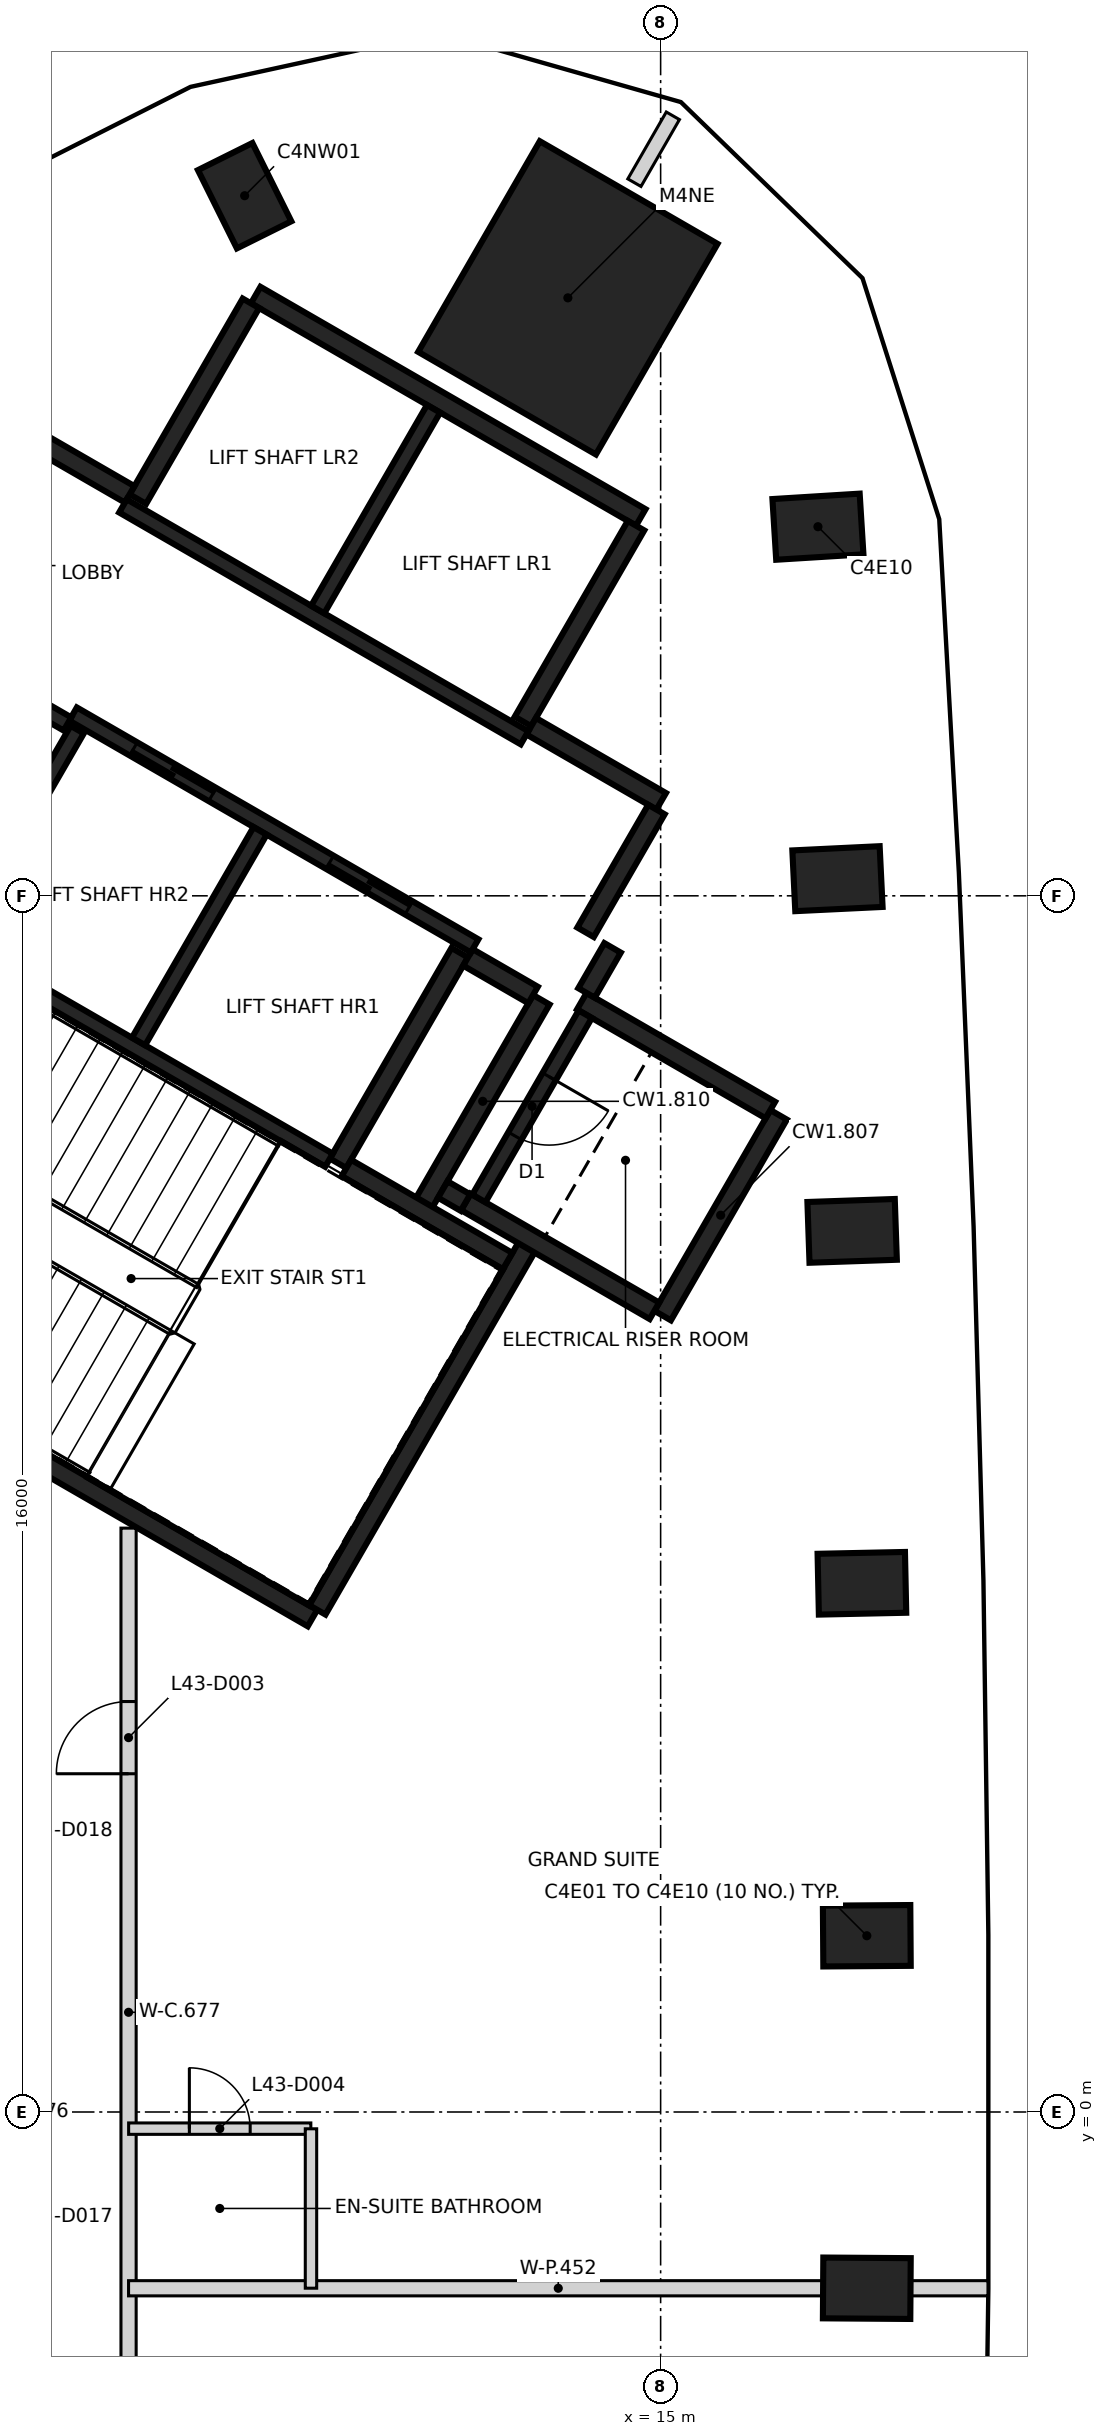
"""IFC4 building model, lengths in metres.
Left out: names, types, materials, properties, quantities, classifications, styles, units other than length and angle.
Written with IfcOpenShell. Run it as: python <this file> out.ifc"""

import sys

from ifc_helpers import new_model, si_unit, direction, frame, frame_2d, origin, origin_2d, place, context, subcontext, project, spatial, rectangle, extrude, element, fill, save


model = new_model("IFC4")
c1 = context("Model", 3, precision=1e-05, world=origin(), true_north=direction((0.0, 1.0)))
c2 = subcontext(c1, "Body", "Model", "MODEL_VIEW")
j1 = project(units=[si_unit("LENGTHUNIT", "METRE"), si_unit("PLANEANGLEUNIT", "RADIAN")], contexts=[c1])
p1 = place(None, origin())
s1 = spatial("IfcSite", under=j1, at=p1, CompositionType="ELEMENT")
p2 = place(p1, origin())
s2 = spatial("IfcBuilding", under=s1, at=p2, CompositionType="ELEMENT")
p3 = place(p2, frame((0.0, 0.0, 175.6)))
s3 = spatial("IfcBuildingStorey", under=s2, at=p3, CompositionType="ELEMENT", Elevation=175.6)
for number, where, z_axis, x_axis in (
    (1, (17.712, -2.319, -0.35), (0.0, 0.0, 1.0), (-1.0, 0.007, 0.0)),
    (2, (17.712, 2.319, -0.35), (0.0, 0.0, 1.0), (1.0, 0.007, 0.0)),
    (3, (17.648, 6.956, -0.35), (0.0, 0.0, 1.0), (1.0, 0.021, 0.0)),
    (4, (17.519, 11.592, -0.35), (0.0, 0.0, 1.0), (0.999, 0.034, 0.0)),
    (5, (17.326, 16.226, -0.35), (0.0, 0.0, 1.0), (0.999, 0.048, 0.0)),
    (6, (17.07, 20.856, -0.35), (0.0, 0.0, 1.0), (0.998, 0.062, 0.0)),
    (7, (9.527, 25.211, -0.35), (0.0, 0.0, 1.0), (-0.445, 0.895, 0.0)),
):
    element("IfcColumn", number, at=place(p3, frame(where, z_axis=z_axis, x_axis=x_axis)), inside=s3, PredefinedType="COLUMN", context=c2, shape_type="SweptSolid", body=[
        extrude(rectangle(XDim=1.15, YDim=0.8, at=origin_2d()), origin(), (0.0, 0.0, 1.0), 3.6),
    ])
p4 = place(p3, frame((13.78, 23.867, -0.35), z_axis=(0.0, 0.0, 1.0), x_axis=(0.5, 0.866025403784, 0.0)))
e8 = element("IfcColumn", 8, at=p4, inside=s3, PredefinedType="COLUMN", context=c2, shape_type="SweptSolid", body=[
    extrude(rectangle(XDim=3.2, YDim=2.7, at=origin_2d()), origin(), (0.0, 0.0, 1.0), 3.6),
])
p5 = place(p3, frame((10.42, 6.498, 0.0), z_axis=(0.0, 0.0, 1.0), x_axis=(-0.866021906294, 0.500006057782, 0.0)))
e9 = element("IfcWall", 9, at=p5, inside=s3, PredefinedType="SHEAR", context=c2, shape_type="SweptSolid", body=[
    extrude(rectangle(XDim=11.55, YDim=0.25, at=frame_2d((5.775, 0.0))), origin(), (0.0, 0.0, 1.0), 3.25),
])
p6 = place(p5, frame((10.025, 0.0, 0.0)))
e10 = element("IfcOpeningElement", 10, at=p6, cuts=e9, PredefinedType="OPENING", context=c2, shape_type="SweptSolid", body=[
    extrude(rectangle(XDim=1.2, YDim=2.1, at=frame_2d((0.6, 1.05))), frame((0.0, 0.135, 0.0), z_axis=(0.0, -1.0, 0.0), x_axis=(1.0, 0.0, 0.0)), (0.0, 0.0, 1.0), 0.27),
])
p7 = place(p5, frame((8.725, 0.0, 0.0)))
e11 = element("IfcOpeningElement", 11, at=p7, cuts=e9, PredefinedType="OPENING", context=c2, shape_type="SweptSolid", body=[
    extrude(rectangle(XDim=1.2, YDim=2.1, at=frame_2d((0.6, 1.05))), frame((0.0, 0.135, 0.0), z_axis=(0.0, -1.0, 0.0), x_axis=(1.0, 0.0, 0.0)), (0.0, 0.0, 1.0), 0.27),
])
p8 = place(p3, frame((9.673, 23.903, 0.0), z_axis=(0.0, 0.0, 1.0), x_axis=(0.86603616409, -0.499981362141, 0.0)))
e12 = element("IfcWall", 12, at=p8, inside=s3, PredefinedType="SHEAR", context=c2, shape_type="SweptSolid", body=[
    extrude(rectangle(XDim=5.85, YDim=0.25, at=frame_2d((2.925, 0.0))), origin(), (0.0, 0.0, 1.0), 3.25),
])
p9 = place(p3, frame((13.238, 11.378, 0.0), z_axis=(0.0, 0.0, 1.0), x_axis=(-0.500008851346, -0.866020293397, 0.0)))
e13 = element("IfcWall", 13, at=p9, inside=s3, PredefinedType="SHEAR", context=c2, shape_type="SweptSolid", body=[
    extrude(rectangle(XDim=5.51, YDim=0.25, at=frame_2d((2.755, 0.0))), origin(), (0.0, 0.0, 1.0), 3.25),
])
p10 = place(p3, frame((12.357, 15.252, 0.0), z_axis=(0.0, 0.0, 1.0), x_axis=(-0.500028443584, -0.866008981251, 0.0)))
e14 = element("IfcWall", 14, at=p10, inside=s3, PredefinedType="SHEAR", context=c2, shape_type="SweptSolid", body=[
    extrude(rectangle(XDim=3.2, YDim=0.25, at=frame_2d((1.6, 0.0))), origin(), (0.0, 0.0, 1.0), 3.25),
])
for number, where, z_axis, x_axis in (
    (15, (8.123, 21.219, 0.0), (0.0, 0.0, 1.0), (0.5, 0.866, 0.0)),
    (16, (14.676, 20.87, 0.0), (0.0, 0.0, 1.0), (-0.5, -0.866, 0.0)),
):
    element("IfcWall", number, at=place(p3, frame(where, z_axis=z_axis, x_axis=x_axis)), inside=s3, PredefinedType="SHEAR", context=c2, shape_type="SweptSolid", body=[
        extrude(rectangle(XDim=2.975, YDim=0.25, at=frame_2d((1.487, 0.0))), origin(), (0.0, 0.0, 1.0), 3.25),
    ])
p11 = place(p3, frame((16.552, 13.119, 0.0), z_axis=(0.0, 0.0, 1.0), x_axis=(-0.499978833458, -0.866037623948, 0.0)))
e17 = element("IfcWall", 17, at=p11, inside=s3, PredefinedType="SHEAR", context=c2, shape_type="SweptSolid", body=[
    extrude(rectangle(XDim=3.05, YDim=0.25, at=frame_2d((1.525, 0.0))), origin(), (0.0, 0.0, 1.0), 3.25),
])
p12 = place(p3, frame((14.918, 10.54, 0.0), z_axis=(0.0, 0.0, 1.0), x_axis=(-0.866063538972, 0.499933942099, 0.0)))
e18 = element("IfcWall", 18, at=p12, inside=s3, PredefinedType="SHEAR", context=c2, shape_type="SweptSolid", body=[
    extrude(rectangle(XDim=2.865, YDim=0.25, at=frame_2d((1.432, 0.0))), origin(), (0.0, 0.0, 1.0), 3.25),
])
p13 = place(p3, frame((13.963, 14.614, 0.0), z_axis=(0.0, 0.0, 1.0), x_axis=(0.866042235819, -0.499970844928, 0.0)))
e19 = element("IfcWall", 19, at=p13, inside=s3, PredefinedType="SHEAR", context=c2, shape_type="SweptSolid", body=[
    extrude(rectangle(XDim=2.865, YDim=0.25, at=frame_2d((1.432, 0.0))), origin(), (0.0, 0.0, 1.0), 3.25),
])
p14 = place(p3, frame((11.888, 11.961, 0.0), z_axis=(0.0, 0.0, 1.0), x_axis=(0.500003324108, 0.866023484601, 0.0)))
e20 = element("IfcWall", 20, at=p14, inside=s3, PredefinedType="SHEAR", context=c2, shape_type="SweptSolid", body=[
    extrude(rectangle(XDim=3.085, YDim=0.25, at=frame_2d((1.542, 0.0))), origin(), (0.0, 0.0, 1.0), 3.25),
])
p15 = place(p3, frame((10.865, 12.418, 0.0), z_axis=(0.0, 0.0, 1.0), x_axis=(0.866026229868, -0.499998569178, 0.0)))
e21 = element("IfcWall", 21, at=p15, inside=s3, PredefinedType="SHEAR", context=c2, shape_type="SweptSolid", body=[
    extrude(rectangle(XDim=2.449, YDim=0.25, at=frame_2d((1.225, 0.0))), origin(), (0.0, 0.0, 1.0), 3.25),
])
p16 = place(p3, frame((13.297, 18.231, 0.0), z_axis=(0.0, 0.0, 1.0), x_axis=(0.866043531843, -0.499968599967, 0.0)))
e22 = element("IfcWall", 22, at=p16, inside=s3, PredefinedType="SHEAR", context=c2, shape_type="SweptSolid", body=[
    extrude(rectangle(XDim=1.975, YDim=0.25, at=frame_2d((0.987, 0.0))), origin(), (0.0, 0.0, 1.0), 3.25),
])
p17 = place(p3, frame((6.413, 22.206, 0.0), z_axis=(0.0, 0.0, 1.0), x_axis=(0.866016279763, -0.500015802937, 0.0)))
e23 = element("IfcWall", 23, at=p17, inside=s3, PredefinedType="SHEAR", context=c2, shape_type="SweptSolid", body=[
    extrude(rectangle(XDim=1.849, YDim=0.25, at=frame_2d((0.925, 0.0))), origin(), (0.0, 0.0, 1.0), 3.25),
])
p18 = place(p3, frame((14.945, 17.135, 0.0), z_axis=(0.0, 0.0, 1.0), x_axis=(-0.499983108224, -0.866035156036, 0.0)))
e24 = element("IfcWall", 24, at=p18, inside=s3, PredefinedType="SHEAR", context=c2, shape_type="SweptSolid", body=[
    extrude(rectangle(XDim=1.865, YDim=0.25, at=frame_2d((0.932, 0.0))), origin(), (0.0, 0.0, 1.0), 3.25),
])
p19 = place(p3, frame((13.322, 14.695, 0.0), z_axis=(0.0, 0.0, 1.0), x_axis=(-0.866017078145, 0.500014420154, 0.0)))
e25 = element("IfcWall", 25, at=p19, inside=s3, PredefinedType="SHEAR", context=c2, shape_type="SweptSolid", body=[
    extrude(rectangle(XDim=0.989, YDim=0.25, at=frame_2d((0.495, 0.0))), origin(), (0.0, 0.0, 1.0), 3.25),
])
p20 = place(p3, frame((14.368, 15.315, 0.0), z_axis=(0.0, 0.0, 1.0), x_axis=(-0.499897359611, -0.866084655132, 0.0)))
e26 = element("IfcWall", 26, at=p20, inside=s3, PredefinedType="SHEAR", context=c2, shape_type="SweptSolid", body=[
    extrude(rectangle(XDim=0.685, YDim=0.25, at=frame_2d((0.342, 0.0))), origin(), (0.0, 0.0, 1.0), 3.25),
])
p21 = place(p3, frame((12.433, 11.964, 0.0), z_axis=(0.0, 0.0, 1.0), x_axis=(-0.866055875208, 0.499947218231, 0.0)))
e27 = element("IfcWall", 27, at=p21, inside=s3, PredefinedType="SHEAR", context=c2, shape_type="SweptSolid", body=[
    extrude(rectangle(XDim=0.345, YDim=0.25, at=frame_2d((0.172, 0.0))), origin(), (0.0, 0.0, 1.0), 3.25),
])
p22 = place(p3, frame((13.21, 18.08, 0.0), z_axis=(0.0, 0.0, 1.0), x_axis=(-0.866030299012, 0.499991521122, 0.0)))
e28 = element("IfcWall", 28, at=p22, inside=s3, PredefinedType="SHEAR", context=c2, shape_type="SweptSolid", body=[
    extrude(rectangle(XDim=6.1, YDim=0.2, at=frame_2d((3.05, 0.0))), origin(), (0.0, 0.0, 1.0), 3.25),
])
p23 = place(p3, frame((12.552, 15.342, 0.0), z_axis=(0.0, 0.0, 1.0), x_axis=(-0.866030299012, 0.499991521122, 0.0)))
e29 = element("IfcWall", 29, at=p23, inside=s3, PredefinedType="SHEAR", context=c2, shape_type="SweptSolid", body=[
    extrude(rectangle(XDim=6.1, YDim=0.2, at=frame_2d((3.05, 0.0))), origin(), (0.0, 0.0, 1.0), 3.25),
])
p24 = place(p23, frame((1.0, 0.0, 0.0)))
e30 = element("IfcOpeningElement", 30, at=p24, cuts=e29, PredefinedType="OPENING", context=c2, shape_type="SweptSolid", body=[
    extrude(rectangle(XDim=1.2, YDim=2.1, at=frame_2d((0.6, 1.05))), frame((0.0, 0.11, 0.0), z_axis=(0.0, -1.0, 0.0), x_axis=(1.0, 0.0, 0.0)), (0.0, 0.0, 1.0), 0.22),
])
p25 = place(p23, frame((3.982, 0.0, 0.0)))
e31 = element("IfcOpeningElement", 31, at=p25, cuts=e29, PredefinedType="OPENING", context=c2, shape_type="SweptSolid", body=[
    extrude(rectangle(XDim=1.2, YDim=2.1, at=frame_2d((0.6, 1.05))), frame((0.0, 0.11, 0.0), z_axis=(0.0, -1.0, 0.0), x_axis=(1.0, 0.0, 0.0)), (0.0, 0.0, 1.0), 0.22),
])
p26 = place(p3, frame((10.636, 12.521, 0.0), z_axis=(0.0, 0.0, 1.0), x_axis=(-0.866013252188, 0.500021046592, 0.0)))
e32 = element("IfcWall", 32, at=p26, inside=s3, PredefinedType="SHEAR", context=c2, shape_type="SweptSolid", body=[
    extrude(rectangle(XDim=5.851, YDim=0.2, at=frame_2d((2.925, 0.0))), origin(), (0.0, 0.0, 1.0), 3.25),
])
p27 = place(p3, frame((8.132, 14.084, 0.0), z_axis=(0.0, 0.0, 1.0), x_axis=(0.500030834389, 0.86600760081, 0.0)))
e33 = element("IfcWall", 33, at=p27, inside=s3, PredefinedType="SHEAR", context=c2, shape_type="SweptSolid", body=[
    extrude(rectangle(XDim=3.198, YDim=0.2, at=frame_2d((1.599, 0.0))), origin(), (0.0, 0.0, 1.0), 3.25),
])
p28 = place(p3, frame((10.489, 19.767, 0.0), z_axis=(0.0, 0.0, 1.0), x_axis=(0.499946628782, 0.866056215479, 0.0)))
e34 = element("IfcWall", 34, at=p28, inside=s3, PredefinedType="SHEAR", context=c2, shape_type="SweptSolid", body=[
    extrude(rectangle(XDim=3.048, YDim=0.2, at=frame_2d((1.524, 0.0))), origin(), (0.0, 0.0, 1.0), 3.25),
])
p29 = place(p3, frame((14.008, 14.442, 0.0), z_axis=(0.0, 0.0, 1.0), x_axis=(-0.499986818241, -0.866033014143, 0.0)))
e35 = element("IfcWall", 35, at=p29, inside=s3, PredefinedType="SHEAR", context=c2, shape_type="SweptSolid", body=[
    extrude(rectangle(XDim=2.798, YDim=0.2, at=frame_2d((1.399, 0.0))), origin(), (0.0, 0.0, 1.0), 3.25),
])
p30 = place(p29, frame((0.949, 0.0, 0.0)))
e36 = element("IfcOpeningElement", 36, at=p30, cuts=e35, PredefinedType="OPENING", context=c2, shape_type="SweptSolid", body=[
    extrude(rectangle(XDim=0.9, YDim=2.1, at=frame_2d((0.45, 1.05))), frame((0.0, 0.11, 0.0), z_axis=(0.0, -1.0, 0.0), x_axis=(1.0, 0.0, 0.0)), (0.0, 0.0, 1.0), 0.22),
])
p31 = place(p3, frame((7.324, 18.187, 0.0), z_axis=(0.0, 0.0, 1.0), x_axis=(-0.499967891604, -0.866043940782, 0.0)))
e37 = element("IfcWall", 37, at=p31, inside=s3, PredefinedType="SHEAR", context=c2, shape_type="SweptSolid", body=[
    extrude(rectangle(XDim=3.1, YDim=0.2, at=frame_2d((1.55, 0.0))), origin(), (0.0, 0.0, 1.0), 3.25),
])
p32 = place(p3, frame((7.196, 18.26, 0.0), z_axis=(0.0, 0.0, 1.0), x_axis=(-0.866018407898, 0.500012117035, 0.0)))
e38 = element("IfcWall", 38, at=p32, inside=s3, PredefinedType="SHEAR", context=c2, shape_type="SweptSolid", body=[
    extrude(rectangle(XDim=2.651, YDim=0.2, at=frame_2d((1.325, 0.0))), origin(), (0.0, 0.0, 1.0), 3.25),
])
p33 = place(p3, frame((8.0, -5.058, 0.0), z_axis=(0.0, 0.0, 1.0), x_axis=(0.0, 1.0, 0.0)))
e39 = element("IfcWall", 39, at=p33, inside=s3, PredefinedType="PARTITIONING", context=c2, shape_type="SweptSolid", body=[
    extrude(rectangle(XDim=12.74, YDim=0.2, at=frame_2d((6.37, 0.0))), origin(), (0.0, 0.0, 1.0), 3.25),
])
p34 = place(p33, frame((9.508, 0.0, 0.0)))
e40 = element("IfcOpeningElement", 40, at=p34, cuts=e39, PredefinedType="OPENING", context=c2, shape_type="SweptSolid", body=[
    extrude(rectangle(XDim=0.95, YDim=2.1, at=frame_2d((0.475, 1.05))), frame((0.0, 0.11, 0.0), z_axis=(0.0, -1.0, 0.0), x_axis=(1.0, 0.0, 0.0)), (0.0, 0.0, 1.0), 0.22),
])
p35 = place(p3, frame((8.0, -2.319, 0.0), z_axis=(0.0, 0.0, 1.0), x_axis=(1.0, 0.0, 0.0)))
e41 = element("IfcWall", 41, at=p35, inside=s3, PredefinedType="PARTITIONING", context=c2, shape_type="SweptSolid", body=[
    extrude(rectangle(XDim=11.306, YDim=0.2, at=frame_2d((5.653, 0.0))), origin(), (0.0, 0.0, 1.0), 3.25),
])
p36 = place(p3, frame((14.655, 25.382, 0.0), z_axis=(0.0, 0.0, 1.0), x_axis=(0.498416889665, 0.866937485691, 0.0)))
e42 = element("IfcWall", 42, at=p36, inside=s3, PredefinedType="PARTITIONING", context=c2, shape_type="SweptSolid", body=[
    extrude(rectangle(XDim=1.015, YDim=0.2, at=frame_2d((0.507, 0.0))), origin(), (0.0, 0.0, 1.0), 3.25),
])
p37 = place(p3, frame((8.001, -0.219, 0.0), z_axis=(0.0, 0.0, 1.0), x_axis=(1.0, 0.0, 0.0)))
e43 = element("IfcWall", 43, at=p37, inside=s3, PredefinedType="PARTITIONING", context=c2, shape_type="SweptSolid", body=[
    extrude(rectangle(XDim=2.397, YDim=0.15, at=frame_2d((1.198, 0.0))), origin(), (0.0, 0.0, 1.0), 3.25),
])
p38 = place(p37, frame((0.799, 0.0, 0.0)))
e44 = element("IfcOpeningElement", 44, at=p38, cuts=e43, PredefinedType="OPENING", context=c2, shape_type="SweptSolid", body=[
    extrude(rectangle(XDim=0.8, YDim=2.1, at=frame_2d((0.4, 1.05))), frame((0.0, 0.085, 0.0), z_axis=(0.0, -1.0, 0.0), x_axis=(1.0, 0.0, 0.0)), (0.0, 0.0, 1.0), 0.17),
])
p39 = place(p3, frame((10.4, -2.318, 0.0), z_axis=(0.0, 0.0, 1.0), x_axis=(0.0, 1.0, 0.0)))
e45 = element("IfcWall", 45, at=p39, inside=s3, PredefinedType="PARTITIONING", context=c2, shape_type="SweptSolid", body=[
    extrude(rectangle(XDim=2.097, YDim=0.15, at=frame_2d((1.049, 0.0))), origin(), (0.0, 0.0, 1.0), 3.25),
])
p40 = place(p24, origin())
e46 = element("IfcDoor", 46, at=p40, inside=s3, OperationType="DOUBLE_DOOR_SLIDING", PredefinedType="DOOR", context=c2, shape_type="SweptSolid", body=[
    extrude(rectangle(XDim=1.2, YDim=2.1, at=frame_2d((0.6, 1.05))), frame((0.0, 0.025, 0.0), z_axis=(0.0, -1.0, 0.0), x_axis=(1.0, 0.0, 0.0)), (0.0, 0.0, 1.0), 0.05),
])
fill(e30, e46)
p41 = place(p25, origin())
e47 = element("IfcDoor", 47, at=p41, inside=s3, OperationType="DOUBLE_DOOR_SLIDING", PredefinedType="DOOR", context=c2, shape_type="SweptSolid", body=[
    extrude(rectangle(XDim=1.2, YDim=2.1, at=frame_2d((0.6, 1.05))), frame((0.0, 0.025, 0.0), z_axis=(0.0, -1.0, 0.0), x_axis=(1.0, 0.0, 0.0)), (0.0, 0.0, 1.0), 0.05),
])
fill(e31, e47)
p42 = place(p30, origin())
e48 = element("IfcDoor", 48, at=p42, inside=s3, OperationType="SINGLE_SWING_LEFT", PredefinedType="DOOR", context=c2, shape_type="SweptSolid", body=[
    extrude(rectangle(XDim=0.9, YDim=2.1, at=frame_2d((0.45, 1.05))), frame((0.0, 0.025, 0.0), z_axis=(0.0, -1.0, 0.0), x_axis=(1.0, 0.0, 0.0)), (0.0, 0.0, 1.0), 0.05),
])
fill(e36, e48)
p43 = place(p34, frame((0.95, 0.0, 0.0), z_axis=(0.0, 0.0, 1.0), x_axis=(-1.0, 0.0, 0.0)))
e49 = element("IfcDoor", 49, at=p43, inside=s3, OperationType="SINGLE_SWING_LEFT", PredefinedType="DOOR", context=c2, shape_type="SweptSolid", body=[
    extrude(rectangle(XDim=0.95, YDim=2.1, at=frame_2d((0.475, 1.05))), frame((0.0, 0.025, 0.0), z_axis=(0.0, -1.0, 0.0), x_axis=(1.0, 0.0, 0.0)), (0.0, 0.0, 1.0), 0.05),
])
fill(e40, e49)
p44 = place(p38, origin())
e50 = element("IfcDoor", 50, at=p44, inside=s3, OperationType="SINGLE_SWING_LEFT", PredefinedType="DOOR", context=c2, shape_type="SweptSolid", body=[
    extrude(rectangle(XDim=0.8, YDim=2.1, at=frame_2d((0.4, 1.05))), frame((0.0, 0.025, 0.0), z_axis=(0.0, -1.0, 0.0), x_axis=(1.0, 0.0, 0.0)), (0.0, 0.0, 1.0), 0.05),
])
fill(e44, e50)
save(model, sys.argv[1])
